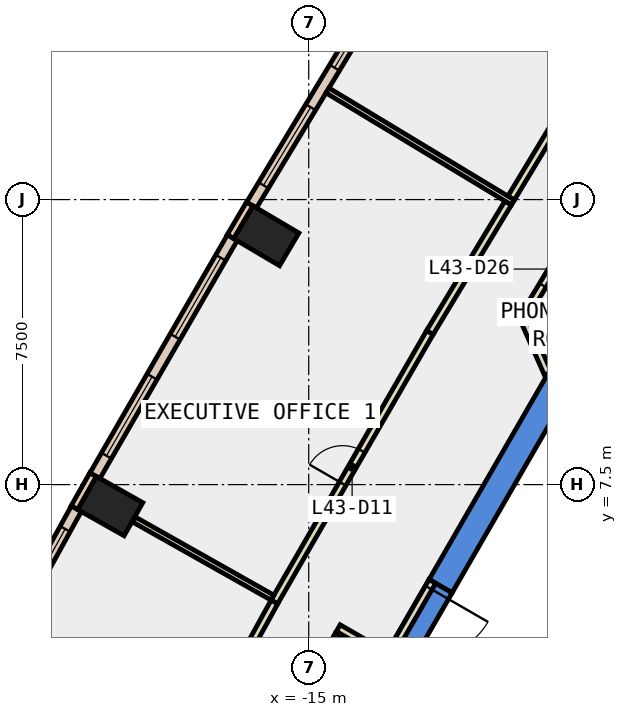
"""IFC4 building model, lengths in metres.
Left out: names, types, materials, properties, quantities, classifications, styles, units other than length and angle.
Written with IfcOpenShell. Run it as: python <this file> out.ifc"""

import sys

from ifc_helpers import new_model, si_unit, direction, frame, frame_2d, origin, origin_2d, place, context, subcontext, project, spatial, polyline, rectangle, outline, extrude, element, fill, save


model = new_model("IFC4")
c1 = context("Model", 3, precision=1e-05, world=origin(), true_north=direction((0.0, 1.0)))
c2 = subcontext(c1, "Body", "Model", "MODEL_VIEW")
j1 = project(units=[si_unit("LENGTHUNIT", "METRE"), si_unit("PLANEANGLEUNIT", "RADIAN")], contexts=[c1])
p1 = place(None, origin())
s1 = spatial("IfcSite", under=j1, at=p1, CompositionType="ELEMENT")
p2 = place(p1, origin())
s2 = spatial("IfcBuilding", under=s1, at=p2, CompositionType="ELEMENT")
p3 = place(p2, frame((0.0, 0.0, 194.0)))
s3 = spatial("IfcBuildingStorey", under=s2, at=p3, CompositionType="ELEMENT", Elevation=194.0)
for number, where, z_axis, x_axis in (
    (1, (-16.116, 14.046, -0.4), (0.0, 0.0, 1.0), (0.509, 0.861, 0.0)),
    (2, (-20.222, 6.934, -0.4), (0.0, 0.0, 1.0), (0.491, 0.871, 0.0)),
):
    element("IfcColumn", number, at=place(p3, frame(where, z_axis=z_axis, x_axis=x_axis)), inside=s3, PredefinedType="COLUMN", context=c2, shape_type="SweptSolid", body=[
        extrude(rectangle(XDim=1.0, YDim=1.4, at=origin_2d()), origin(), (0.0, 0.0, 1.0), 4.2),
    ])
p4 = place(p3, frame((0.0, 0.0, -0.4)))
e3 = element("IfcWall", 3, at=p4, inside=s3, PredefinedType="SHEAR", context=c2, shape_type="SweptSolid", body=[
    extrude(outline(polyline([(-11.834, 5.002), (-11.228, 4.652), (-6.235, 13.3), (-6.64, 14.0), (-11.834, 5.002)])), origin(), (0.0, 0.0, 1.0), 4.2),
])
p5 = place(p3, frame((0.0, 0.0, 3.6)))
e4 = element("IfcWall", 4, at=p5, inside=s3, PredefinedType="SHEAR", context=c2, shape_type="SweptSolid", body=[
    extrude(outline(polyline([(-12.834, 3.27), (-12.228, 2.92), (-11.228, 4.652), (-11.834, 5.002), (-12.834, 3.27)])), origin(), (0.0, 0.0, 1.0), 0.2),
])
p6 = place(p3, frame((-16.551, 14.884, 0.0), z_axis=(0.0, 0.0, 1.0), x_axis=(-0.508161541526, -0.861261776531, 0.0)))
e5 = element("IfcWall", 5, at=p6, inside=s3, PredefinedType="STANDARD", context=c2, shape_type="SweptSolid", body=[
    extrude(rectangle(XDim=1.0, YDim=0.2, at=frame_2d((0.5, 0.0))), origin(), (0.0, 0.0, 1.0), 3.8),
])
p7 = place(p3, frame((-20.673, 7.762, 0.0), z_axis=(0.0, 0.0, 1.0), x_axis=(-0.491848119507, -0.870681013539, 0.0)))
e6 = element("IfcWall", 6, at=p7, inside=s3, PredefinedType="STANDARD", context=c2, shape_type="SweptSolid", body=[
    extrude(rectangle(XDim=1.0, YDim=0.2, at=frame_2d((0.5, 0.0))), origin(), (0.0, 0.0, 1.0), 3.8),
])
p8 = place(p3, frame((-12.765, 21.043, 0.0), z_axis=(0.0, 0.0, 1.0), x_axis=(-0.517159962006, -0.855888762456, 0.0)))
e7 = element("IfcWall", 7, at=p8, inside=s3, PredefinedType="STANDARD", context=c2, shape_type="SweptSolid", body=[
    extrude(rectangle(XDim=7.23, YDim=0.3, at=frame_2d((3.615, 0.0))), origin(), (0.0, 0.0, 1.0), 3.8),
])
p9 = place(p8, frame((0.607, 0.0, 0.9)))
e8 = element("IfcOpeningElement", 8, at=p9, cuts=e7, PredefinedType="OPENING", context=c2, shape_type="SweptSolid", body=[
    extrude(rectangle(XDim=2.4, YDim=2.6, at=frame_2d((1.2, 1.3))), frame((0.0, 0.16, 0.0), z_axis=(0.0, -1.0, 0.0), x_axis=(1.0, 0.0, 0.0)), (0.0, 0.0, 1.0), 0.32),
])
p10 = place(p8, frame((4.222, 0.0, 0.9)))
e9 = element("IfcOpeningElement", 9, at=p10, cuts=e7, PredefinedType="OPENING", context=c2, shape_type="SweptSolid", body=[
    extrude(rectangle(XDim=2.4, YDim=2.6, at=frame_2d((1.2, 1.3))), frame((0.0, 0.16, 0.0), z_axis=(0.0, -1.0, 0.0), x_axis=(1.0, 0.0, 0.0)), (0.0, 0.0, 1.0), 0.32),
])
p11 = place(p3, frame((-17.011, 13.996, 0.0), z_axis=(0.0, 0.0, 1.0), x_axis=(-0.499948481376, -0.866055146033, 0.0)))
e10 = element("IfcWall", 10, at=p11, inside=s3, PredefinedType="STANDARD", context=c2, shape_type="SweptSolid", body=[
    extrude(rectangle(XDim=7.231, YDim=0.3, at=frame_2d((3.615, 0.0))), origin(), (0.0, 0.0, 1.0), 3.8),
])
p12 = place(p11, frame((0.608, 0.0, 0.9)))
e11 = element("IfcOpeningElement", 11, at=p12, cuts=e10, PredefinedType="OPENING", context=c2, shape_type="SweptSolid", body=[
    extrude(rectangle(XDim=2.4, YDim=2.6, at=frame_2d((1.2, 1.3))), frame((0.0, 0.16, 0.0), z_axis=(0.0, -1.0, 0.0), x_axis=(1.0, 0.0, 0.0)), (0.0, 0.0, 1.0), 0.32),
])
p13 = place(p11, frame((4.223, 0.0, 0.9)))
e12 = element("IfcOpeningElement", 12, at=p13, cuts=e10, PredefinedType="OPENING", context=c2, shape_type="SweptSolid", body=[
    extrude(rectangle(XDim=2.4, YDim=2.6, at=frame_2d((1.2, 1.3))), frame((0.0, 0.16, 0.0), z_axis=(0.0, -1.0, 0.0), x_axis=(1.0, 0.0, 0.0)), (0.0, 0.0, 1.0), 0.32),
])
p14 = place(p3, frame((-21.116, 6.865, 0.0), z_axis=(0.0, 0.0, 1.0), x_axis=(-0.482862185961, -0.875696356832, 0.0)))
e13 = element("IfcWall", 13, at=p14, inside=s3, PredefinedType="STANDARD", context=c2, shape_type="SweptSolid", body=[
    extrude(rectangle(XDim=7.23, YDim=0.3, at=frame_2d((3.615, 0.0))), origin(), (0.0, 0.0, 1.0), 3.8),
])
p15 = place(p14, frame((0.607, 0.0, 0.9)))
e14 = element("IfcOpeningElement", 14, at=p15, cuts=e13, PredefinedType="OPENING", context=c2, shape_type="SweptSolid", body=[
    extrude(rectangle(XDim=2.4, YDim=2.6, at=frame_2d((1.2, 1.3))), frame((0.0, 0.16, 0.0), z_axis=(0.0, -1.0, 0.0), x_axis=(1.0, 0.0, 0.0)), (0.0, 0.0, 1.0), 0.32),
])
p16 = place(p14, frame((4.222, 0.0, 0.9)))
e15 = element("IfcOpeningElement", 15, at=p16, cuts=e13, PredefinedType="OPENING", context=c2, shape_type="SweptSolid", body=[
    extrude(rectangle(XDim=2.4, YDim=2.6, at=frame_2d((1.2, 1.3))), frame((0.0, 0.16, 0.0), z_axis=(0.0, -1.0, 0.0), x_axis=(1.0, 0.0, 0.0)), (0.0, 0.0, 1.0), 0.32),
])
p17 = place(p3, frame((-7.759, 14.536, 0.0), z_axis=(0.0, 0.0, 1.0), x_axis=(-0.516926279395, -0.856029918678, 0.0)))
e16 = element("IfcWall", 16, at=p17, inside=s3, PredefinedType="PARTITIONING", context=c2, shape_type="SweptSolid", body=[
    extrude(rectangle(XDim=3.188, YDim=0.2, at=frame_2d((1.594, 0.0))), origin(), (0.0, 0.0, 1.0), 3.8),
])
p18 = place(p17, frame((1.094, 0.0, 0.0)))
e17 = element("IfcOpeningElement", 17, at=p18, cuts=e16, PredefinedType="OPENING", context=c2, shape_type="SweptSolid", body=[
    extrude(rectangle(XDim=1.0, YDim=2.1, at=frame_2d((0.5, 1.05))), frame((0.0, 0.11, 0.0), z_axis=(0.0, -1.0, 0.0), x_axis=(1.0, 0.0, 0.0)), (0.0, 0.0, 1.0), 0.22),
])
p19 = place(p3, frame((-9.315, 11.801, 0.0), z_axis=(0.0, 0.0, 1.0), x_axis=(0.403943240321, -0.914784050254, 0.0)))
e18 = element("IfcWall", 18, at=p19, inside=s3, PredefinedType="PARTITIONING", context=c2, shape_type="SweptSolid", body=[
    extrude(rectangle(XDim=1.507, YDim=0.2, at=frame_2d((0.754, 0.0))), origin(), (0.0, 0.0, 1.0), 3.8),
])
p20 = place(p3, frame((-14.213, 3.543, 0.0), z_axis=(0.0, 0.0, 1.0), x_axis=(-0.482724934882, -0.875772023556, 0.0)))
e19 = element("IfcWall", 19, at=p20, inside=s3, PredefinedType="PARTITIONING", context=c2, shape_type="SweptSolid", body=[
    extrude(rectangle(XDim=8.077, YDim=0.2, at=frame_2d((4.039, 0.0))), origin(), (0.0, 0.0, 1.0), 3.8),
])
p21 = place(p20, frame((3.139, 0.0, 0.0)))
e20 = element("IfcOpeningElement", 20, at=p21, cuts=e19, PredefinedType="OPENING", context=c2, shape_type="SweptSolid", body=[
    extrude(rectangle(XDim=1.8, YDim=2.1, at=frame_2d((0.9, 1.05))), frame((0.0, 0.11, 0.0), z_axis=(0.0, -1.0, 0.0), x_axis=(1.0, 0.0, 0.0)), (0.0, 0.0, 1.0), 0.22),
])
p22 = place(p3, frame((-9.674, 15.039, 0.0), z_axis=(0.0, 0.0, 1.0), x_axis=(0.516918251554, 0.856034766356, 0.0)))
e21 = element("IfcWall", 21, at=p22, inside=s3, PredefinedType="PARTITIONING", context=c2, shape_type="SweptSolid", body=[
    extrude(rectangle(XDim=3.983, YDim=0.2, at=frame_2d((1.992, 0.0))), origin(), (0.0, 0.0, 1.0), 3.8),
])
p23 = place(p3, frame((-15.905, 4.412, 0.0), z_axis=(0.0, 0.0, 1.0), x_axis=(0.5000098125, 0.866019738461, 0.0)))
e22 = element("IfcWall", 22, at=p23, inside=s3, PredefinedType="PARTITIONING", context=c2, shape_type="SweptSolid", body=[
    extrude(rectangle(XDim=8.188, YDim=0.2, at=frame_2d((4.094, 0.0))), origin(), (0.0, 0.0, 1.0), 3.8),
])
p24 = place(p23, frame((3.594, 0.0, 0.0)))
e23 = element("IfcOpeningElement", 23, at=p24, cuts=e22, PredefinedType="OPENING", context=c2, shape_type="SweptSolid", body=[
    extrude(rectangle(XDim=1.0, YDim=2.1, at=frame_2d((0.5, 1.05))), frame((0.0, 0.11, 0.0), z_axis=(0.0, -1.0, 0.0), x_axis=(1.0, 0.0, 0.0)), (0.0, 0.0, 1.0), 0.22),
])
p25 = place(p3, frame((-11.811, 11.503, 0.0), z_axis=(0.0, 0.0, 1.0), x_axis=(0.517135291957, 0.855903668535, 0.0)))
e24 = element("IfcWall", 24, at=p25, inside=s3, PredefinedType="PARTITIONING", context=c2, shape_type="SweptSolid", body=[
    extrude(rectangle(XDim=3.982, YDim=0.2, at=frame_2d((1.991, 0.0))), origin(), (0.0, 0.0, 1.0), 3.8),
])
p26 = place(p3, frame((-19.785, -2.63, 0.0), z_axis=(0.0, 0.0, 1.0), x_axis=(0.482817232578, 0.875721142788, 0.0)))
e25 = element("IfcWall", 25, at=p26, inside=s3, PredefinedType="PARTITIONING", context=c2, shape_type="SweptSolid", body=[
    extrude(rectangle(XDim=8.04, YDim=0.2, at=frame_2d((4.02, 0.0))), origin(), (0.0, 0.0, 1.0), 3.8),
])
p27 = place(p26, frame((3.595, 0.0, 0.0)))
e26 = element("IfcOpeningElement", 26, at=p27, cuts=e25, PredefinedType="OPENING", context=c2, shape_type="SweptSolid", body=[
    extrude(rectangle(XDim=1.0, YDim=2.1, at=frame_2d((0.5, 1.05))), frame((0.0, 0.11, 0.0), z_axis=(0.0, -1.0, 0.0), x_axis=(1.0, 0.0, 0.0)), (0.0, 0.0, 1.0), 0.22),
])
p28 = place(p3, frame((-9.628, 14.924, 0.0), z_axis=(0.0, 0.0, 1.0), x_axis=(-0.855931736607, 0.517088834021, 0.0)))
e27 = element("IfcWall", 27, at=p28, inside=s3, PredefinedType="PARTITIONING", context=c2, shape_type="SweptSolid", body=[
    extrude(rectangle(XDim=5.699, YDim=0.15, at=frame_2d((2.85, 0.0))), origin(), (0.0, 0.0, 1.0), 3.8),
])
p29 = place(p3, frame((-15.954, 4.526, 0.0), z_axis=(0.0, 0.0, 1.0), x_axis=(-0.870940016277, 0.491389344663, 0.0)))
e28 = element("IfcWall", 28, at=p29, inside=s3, PredefinedType="PARTITIONING", context=c2, shape_type="SweptSolid", body=[
    extrude(rectangle(XDim=4.18, YDim=0.15, at=frame_2d((2.09, 0.0))), origin(), (0.0, 0.0, 1.0), 3.8),
])
p30 = place(p3, frame((-11.747, 4.952, 0.0), z_axis=(0.0, 0.0, 1.0), x_axis=(-0.50002537861, -0.866010750942, 0.0)))
e29 = element("IfcWall", 29, at=p30, inside=s3, PredefinedType="PARTITIONING", context=c2, shape_type="SweptSolid", body=[
    extrude(rectangle(XDim=2.0, YDim=0.2, at=frame_2d((1.0, 0.0))), origin(), (0.0, 0.0, 1.0), 2.4),
])
p31 = place(p30, frame((0.19, 0.0, 0.0)))
e30 = element("IfcOpeningElement", 30, at=p31, cuts=e29, PredefinedType="OPENING", context=c2, shape_type="SweptSolid", body=[
    extrude(rectangle(XDim=1.8, YDim=2.1, at=frame_2d((0.9, 1.05))), frame((0.0, 0.11, 0.0), z_axis=(0.0, -1.0, 0.0), x_axis=(1.0, 0.0, 0.0)), (0.0, 0.0, 1.0), 0.22),
])
p32 = place(p3, frame((-13.287, 3.185, 0.0), z_axis=(0.0, 0.0, 1.0), x_axis=(-0.866121626761, 0.499833299868, 0.0)))
e31 = element("IfcWall", 31, at=p32, inside=s3, PredefinedType="PARTITIONING", context=c2, shape_type="SweptSolid", body=[
    extrude(rectangle(XDim=1.08, YDim=0.2, at=frame_2d((0.54, 0.0))), origin(), (0.0, 0.0, 1.0), 3.8),
])
p33 = place(p9, origin())
e32 = element("IfcWindow", 32, at=p33, inside=s3, PartitioningType="SINGLE_PANEL", PredefinedType="WINDOW", context=c2, shape_type="SweptSolid", body=[
    extrude(rectangle(XDim=2.4, YDim=2.6, at=frame_2d((1.2, 1.3))), frame((0.0, 0.03, 0.0), z_axis=(0.0, -1.0, 0.0), x_axis=(1.0, 0.0, 0.0)), (0.0, 0.0, 1.0), 0.06),
])
fill(e8, e32)
p34 = place(p10, origin())
e33 = element("IfcWindow", 33, at=p34, inside=s3, PartitioningType="SINGLE_PANEL", PredefinedType="WINDOW", context=c2, shape_type="SweptSolid", body=[
    extrude(rectangle(XDim=2.4, YDim=2.6, at=frame_2d((1.2, 1.3))), frame((0.0, 0.03, 0.0), z_axis=(0.0, -1.0, 0.0), x_axis=(1.0, 0.0, 0.0)), (0.0, 0.0, 1.0), 0.06),
])
fill(e9, e33)
p35 = place(p12, origin())
e34 = element("IfcWindow", 34, at=p35, inside=s3, PartitioningType="SINGLE_PANEL", PredefinedType="WINDOW", context=c2, shape_type="SweptSolid", body=[
    extrude(rectangle(XDim=2.4, YDim=2.6, at=frame_2d((1.2, 1.3))), frame((0.0, 0.03, 0.0), z_axis=(0.0, -1.0, 0.0), x_axis=(1.0, 0.0, 0.0)), (0.0, 0.0, 1.0), 0.06),
])
fill(e11, e34)
p36 = place(p13, origin())
e35 = element("IfcWindow", 35, at=p36, inside=s3, PartitioningType="SINGLE_PANEL", PredefinedType="WINDOW", context=c2, shape_type="SweptSolid", body=[
    extrude(rectangle(XDim=2.4, YDim=2.6, at=frame_2d((1.2, 1.3))), frame((0.0, 0.03, 0.0), z_axis=(0.0, -1.0, 0.0), x_axis=(1.0, 0.0, 0.0)), (0.0, 0.0, 1.0), 0.06),
])
fill(e12, e35)
p37 = place(p15, origin())
e36 = element("IfcWindow", 36, at=p37, inside=s3, PartitioningType="SINGLE_PANEL", PredefinedType="WINDOW", context=c2, shape_type="SweptSolid", body=[
    extrude(rectangle(XDim=2.4, YDim=2.6, at=frame_2d((1.2, 1.3))), frame((0.0, 0.03, 0.0), z_axis=(0.0, -1.0, 0.0), x_axis=(1.0, 0.0, 0.0)), (0.0, 0.0, 1.0), 0.06),
])
fill(e14, e36)
p38 = place(p24, origin())
e37 = element("IfcDoor", 37, at=p38, inside=s3, OperationType="SINGLE_SWING_LEFT", PredefinedType="DOOR", context=c2, shape_type="SweptSolid", body=[
    extrude(rectangle(XDim=1.0, YDim=2.1, at=frame_2d((0.5, 1.05))), frame((0.0, 0.025, 0.0), z_axis=(0.0, -1.0, 0.0), x_axis=(1.0, 0.0, 0.0)), (0.0, 0.0, 1.0), 0.05),
])
fill(e23, e37)
p39 = place(p18, origin())
e38 = element("IfcDoor", 38, at=p39, inside=s3, OperationType="SINGLE_SWING_LEFT", PredefinedType="DOOR", context=c2, shape_type="SweptSolid", body=[
    extrude(rectangle(XDim=1.0, YDim=2.1, at=frame_2d((0.5, 1.05))), frame((0.0, 0.025, 0.0), z_axis=(0.0, -1.0, 0.0), x_axis=(1.0, 0.0, 0.0)), (0.0, 0.0, 1.0), 0.05),
])
fill(e17, e38)
p40 = place(p31, origin())
e39 = element("IfcDoor", 39, at=p40, inside=s3, OperationType="DOUBLE_DOOR_SINGLE_SWING", PredefinedType="DOOR", context=c2, shape_type="SweptSolid", body=[
    extrude(rectangle(XDim=1.8, YDim=2.1, at=frame_2d((0.9, 1.05))), frame((0.0, 0.025, 0.0), z_axis=(0.0, -1.0, 0.0), x_axis=(1.0, 0.0, 0.0)), (0.0, 0.0, 1.0), 0.05),
])
fill(e30, e39)
save(model, sys.argv[1])
